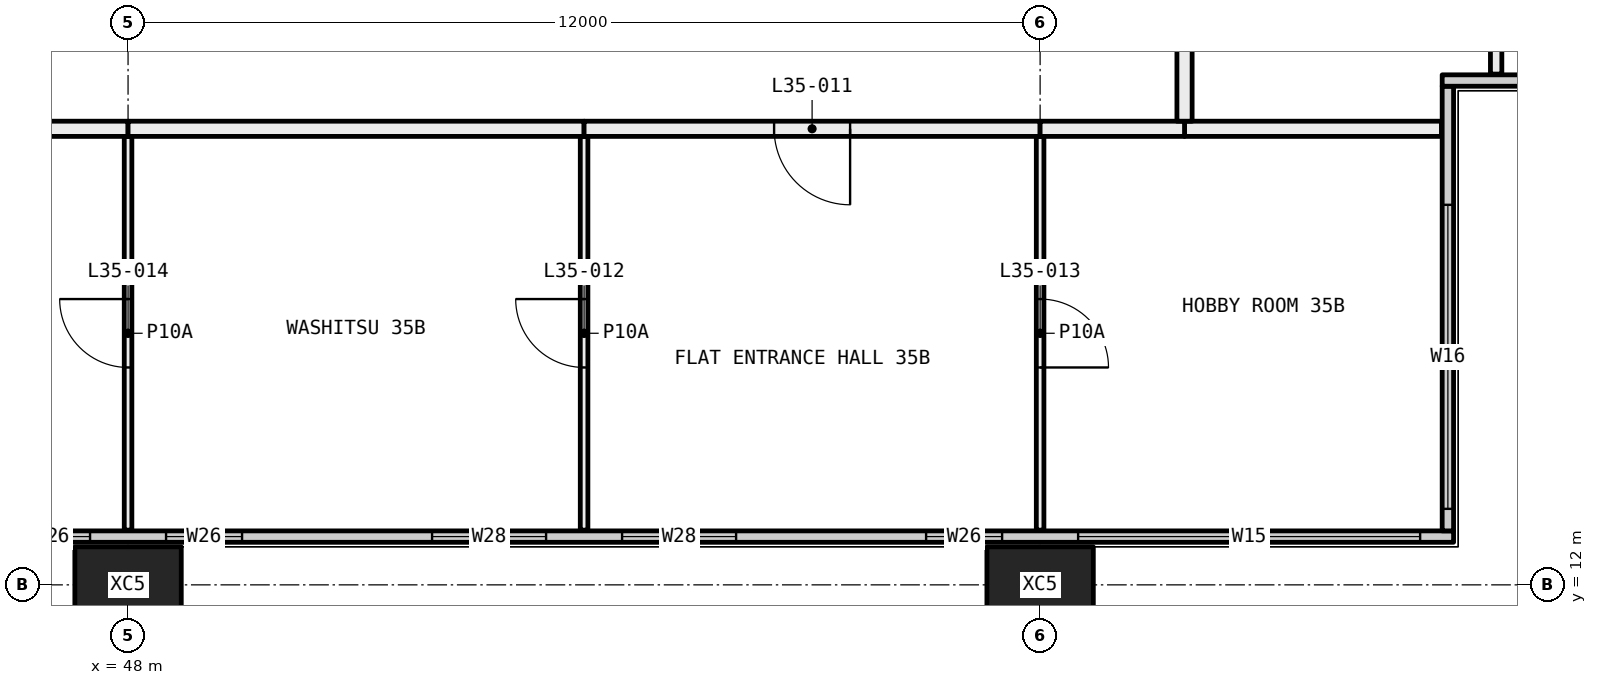
"""IFC4 building model, lengths in metres.
Left out: names, types, materials, properties, quantities, classifications, styles, units other than length and angle.
Written with IfcOpenShell. Run it as: python <this file> out.ifc"""

import sys

from ifc_helpers import new_model, si_unit, direction, frame, frame_2d, origin, origin_2d, place, context, subcontext, project, spatial, rectangle, hollow_rectangle, extrude, element, fill, save


model = new_model("IFC4")
c1 = context("Model", 3, precision=1e-05, world=origin(), true_north=direction((0.0, 1.0)))
c2 = subcontext(c1, "Body", "Model", "MODEL_VIEW")
j1 = project(units=[si_unit("LENGTHUNIT", "METRE"), si_unit("PLANEANGLEUNIT", "RADIAN")], contexts=[c1])
p1 = place(None, origin())
s1 = spatial("IfcSite", under=j1, at=p1, CompositionType="ELEMENT")
p2 = place(p1, origin())
s2 = spatial("IfcBuilding", under=s1, at=p2, CompositionType="ELEMENT")
p3 = place(p2, frame((0.0, 0.0, 134.55)))
s3 = spatial("IfcBuildingStorey", under=s2, at=p3, CompositionType="ELEMENT", Elevation=134.55)
for number, where, z_axis, x_axis in (
    (1, (48.0, 12.0, -0.4), (0.0, 0.0, 1.0), (1.0, 0.0, 0.0)),
    (2, (60.0, 12.0, -0.4), (0.0, 0.0, 1.0), (1.0, 0.0, 0.0)),
):
    element("IfcColumn", number, at=place(p3, frame(where, z_axis=z_axis, x_axis=x_axis)), inside=s3, PredefinedType="COLUMN", context=c2, shape_type="SweptSolid", body=[
        extrude(hollow_rectangle(XDim=1.4, YDim=1.0, WallThickness=0.055, at=origin_2d()), origin(), (0.0, 0.0, 1.0), 3.45),
    ])
p4 = place(p3, frame((6.56, 12.635, 0.0), z_axis=(0.0, 0.0, 1.0), x_axis=(1.0, 0.0, 0.0)))
e3 = element("IfcWall", 3, at=p4, inside=s3, PredefinedType="ELEMENTEDWALL", context=c2, shape_type="SweptSolid", body=[
    extrude(rectangle(XDim=58.88, YDim=0.15, at=frame_2d((29.44, 0.0))), origin(), (0.0, 0.0, 1.0), 3.05),
])
p5 = place(p4, frame((0.44, 0.0, 0.45)))
e4 = element("IfcOpeningElement", 4, at=p5, cuts=e3, PredefinedType="OPENING", context=c2, shape_type="SweptSolid", body=[
    extrude(rectangle(XDim=4.5, YDim=2.55, at=frame_2d((2.25, 1.275))), frame((0.0, 0.085, 0.0), z_axis=(0.0, -1.0, 0.0), x_axis=(1.0, 0.0, 0.0)), (0.0, 0.0, 1.0), 0.17),
])
p6 = place(p4, frame((5.94, 0.0, 0.45)))
e5 = element("IfcOpeningElement", 5, at=p6, cuts=e3, PredefinedType="OPENING", context=c2, shape_type="SweptSolid", body=[
    extrude(rectangle(XDim=1.0, YDim=2.55, at=frame_2d((0.5, 1.275))), frame((0.0, 0.085, 0.0), z_axis=(0.0, -1.0, 0.0), x_axis=(1.0, 0.0, 0.0)), (0.0, 0.0, 1.0), 0.17),
])
p7 = place(p4, frame((9.44, 0.0, 0.45)))
e6 = element("IfcOpeningElement", 6, at=p7, cuts=e3, PredefinedType="OPENING", context=c2, shape_type="SweptSolid", body=[
    extrude(rectangle(XDim=1.5, YDim=2.55, at=frame_2d((0.75, 1.275))), frame((0.0, 0.085, 0.0), z_axis=(0.0, -1.0, 0.0), x_axis=(1.0, 0.0, 0.0)), (0.0, 0.0, 1.0), 0.17),
])
p8 = place(p4, frame((11.94, 0.0, 0.45)))
e7 = element("IfcOpeningElement", 7, at=p8, cuts=e3, PredefinedType="OPENING", context=c2, shape_type="SweptSolid", body=[
    extrude(rectangle(XDim=1.5, YDim=2.55, at=frame_2d((0.75, 1.275))), frame((0.0, 0.085, 0.0), z_axis=(0.0, -1.0, 0.0), x_axis=(1.0, 0.0, 0.0)), (0.0, 0.0, 1.0), 0.17),
])
p9 = place(p4, frame((15.94, 0.0, 0.45)))
e8 = element("IfcOpeningElement", 8, at=p9, cuts=e3, PredefinedType="OPENING", context=c2, shape_type="SweptSolid", body=[
    extrude(rectangle(XDim=1.0, YDim=2.55, at=frame_2d((0.5, 1.275))), frame((0.0, 0.085, 0.0), z_axis=(0.0, -1.0, 0.0), x_axis=(1.0, 0.0, 0.0)), (0.0, 0.0, 1.0), 0.17),
])
p10 = place(p4, frame((17.94, 0.0, 0.45)))
e9 = element("IfcOpeningElement", 9, at=p10, cuts=e3, PredefinedType="OPENING", context=c2, shape_type="SweptSolid", body=[
    extrude(rectangle(XDim=1.0, YDim=2.55, at=frame_2d((0.5, 1.275))), frame((0.0, 0.085, 0.0), z_axis=(0.0, -1.0, 0.0), x_axis=(1.0, 0.0, 0.0)), (0.0, 0.0, 1.0), 0.17),
])
p11 = place(p4, frame((21.44, 0.0, 0.45)))
e10 = element("IfcOpeningElement", 10, at=p11, cuts=e3, PredefinedType="OPENING", context=c2, shape_type="SweptSolid", body=[
    extrude(rectangle(XDim=1.5, YDim=2.55, at=frame_2d((0.75, 1.275))), frame((0.0, 0.085, 0.0), z_axis=(0.0, -1.0, 0.0), x_axis=(1.0, 0.0, 0.0)), (0.0, 0.0, 1.0), 0.17),
])
p12 = place(p4, frame((23.94, 0.0, 0.45)))
e11 = element("IfcOpeningElement", 11, at=p12, cuts=e3, PredefinedType="OPENING", context=c2, shape_type="SweptSolid", body=[
    extrude(rectangle(XDim=1.5, YDim=2.55, at=frame_2d((0.75, 1.275))), frame((0.0, 0.085, 0.0), z_axis=(0.0, -1.0, 0.0), x_axis=(1.0, 0.0, 0.0)), (0.0, 0.0, 1.0), 0.17),
])
p13 = place(p4, frame((27.94, 0.0, 0.45)))
e12 = element("IfcOpeningElement", 12, at=p13, cuts=e3, PredefinedType="OPENING", context=c2, shape_type="SweptSolid", body=[
    extrude(rectangle(XDim=1.0, YDim=2.55, at=frame_2d((0.5, 1.275))), frame((0.0, 0.085, 0.0), z_axis=(0.0, -1.0, 0.0), x_axis=(1.0, 0.0, 0.0)), (0.0, 0.0, 1.0), 0.17),
])
p14 = place(p4, frame((29.94, 0.0, 0.45)))
e13 = element("IfcOpeningElement", 13, at=p14, cuts=e3, PredefinedType="OPENING", context=c2, shape_type="SweptSolid", body=[
    extrude(rectangle(XDim=1.0, YDim=2.55, at=frame_2d((0.5, 1.275))), frame((0.0, 0.085, 0.0), z_axis=(0.0, -1.0, 0.0), x_axis=(1.0, 0.0, 0.0)), (0.0, 0.0, 1.0), 0.17),
])
p15 = place(p4, frame((33.44, 0.0, 0.45)))
e14 = element("IfcOpeningElement", 14, at=p15, cuts=e3, PredefinedType="OPENING", context=c2, shape_type="SweptSolid", body=[
    extrude(rectangle(XDim=1.5, YDim=2.55, at=frame_2d((0.75, 1.275))), frame((0.0, 0.085, 0.0), z_axis=(0.0, -1.0, 0.0), x_axis=(1.0, 0.0, 0.0)), (0.0, 0.0, 1.0), 0.17),
])
p16 = place(p4, frame((35.94, 0.0, 0.45)))
e15 = element("IfcOpeningElement", 15, at=p16, cuts=e3, PredefinedType="OPENING", context=c2, shape_type="SweptSolid", body=[
    extrude(rectangle(XDim=1.5, YDim=2.55, at=frame_2d((0.75, 1.275))), frame((0.0, 0.085, 0.0), z_axis=(0.0, -1.0, 0.0), x_axis=(1.0, 0.0, 0.0)), (0.0, 0.0, 1.0), 0.17),
])
p17 = place(p4, frame((39.94, 0.0, 0.45)))
e16 = element("IfcOpeningElement", 16, at=p17, cuts=e3, PredefinedType="OPENING", context=c2, shape_type="SweptSolid", body=[
    extrude(rectangle(XDim=1.0, YDim=2.55, at=frame_2d((0.5, 1.275))), frame((0.0, 0.085, 0.0), z_axis=(0.0, -1.0, 0.0), x_axis=(1.0, 0.0, 0.0)), (0.0, 0.0, 1.0), 0.17),
])
p18 = place(p4, frame((41.94, 0.0, 0.45)))
e17 = element("IfcOpeningElement", 17, at=p18, cuts=e3, PredefinedType="OPENING", context=c2, shape_type="SweptSolid", body=[
    extrude(rectangle(XDim=1.0, YDim=2.55, at=frame_2d((0.5, 1.275))), frame((0.0, 0.085, 0.0), z_axis=(0.0, -1.0, 0.0), x_axis=(1.0, 0.0, 0.0)), (0.0, 0.0, 1.0), 0.17),
])
p19 = place(p4, frame((45.44, 0.0, 0.45)))
e18 = element("IfcOpeningElement", 18, at=p19, cuts=e3, PredefinedType="OPENING", context=c2, shape_type="SweptSolid", body=[
    extrude(rectangle(XDim=1.5, YDim=2.55, at=frame_2d((0.75, 1.275))), frame((0.0, 0.085, 0.0), z_axis=(0.0, -1.0, 0.0), x_axis=(1.0, 0.0, 0.0)), (0.0, 0.0, 1.0), 0.17),
])
p20 = place(p4, frame((47.94, 0.0, 0.45)))
e19 = element("IfcOpeningElement", 19, at=p20, cuts=e3, PredefinedType="OPENING", context=c2, shape_type="SweptSolid", body=[
    extrude(rectangle(XDim=1.5, YDim=2.55, at=frame_2d((0.75, 1.275))), frame((0.0, 0.085, 0.0), z_axis=(0.0, -1.0, 0.0), x_axis=(1.0, 0.0, 0.0)), (0.0, 0.0, 1.0), 0.17),
])
p21 = place(p4, frame((51.94, 0.0, 0.45)))
e20 = element("IfcOpeningElement", 20, at=p21, cuts=e3, PredefinedType="OPENING", context=c2, shape_type="SweptSolid", body=[
    extrude(rectangle(XDim=1.0, YDim=2.55, at=frame_2d((0.5, 1.275))), frame((0.0, 0.085, 0.0), z_axis=(0.0, -1.0, 0.0), x_axis=(1.0, 0.0, 0.0)), (0.0, 0.0, 1.0), 0.17),
])
p22 = place(p4, frame((53.94, 0.0, 0.45)))
e21 = element("IfcOpeningElement", 21, at=p22, cuts=e3, PredefinedType="OPENING", context=c2, shape_type="SweptSolid", body=[
    extrude(rectangle(XDim=4.5, YDim=2.55, at=frame_2d((2.25, 1.275))), frame((0.0, 0.085, 0.0), z_axis=(0.0, -1.0, 0.0), x_axis=(1.0, 0.0, 0.0)), (0.0, 0.0, 1.0), 0.17),
])
p23 = place(p3, frame((65.365, 12.71, 0.0), z_axis=(0.0, 0.0, 1.0), x_axis=(0.0, 1.0, 0.0)))
e22 = element("IfcWall", 22, at=p23, inside=s3, PredefinedType="ELEMENTEDWALL", context=c2, shape_type="SweptSolid", body=[
    extrude(rectangle(XDim=5.85, YDim=0.15, at=frame_2d((2.925, 0.0))), origin(), (0.0, 0.0, 1.0), 3.05),
])
p24 = place(p23, frame((0.29, 0.0, 0.45)))
e23 = element("IfcOpeningElement", 23, at=p24, cuts=e22, PredefinedType="OPENING", context=c2, shape_type="SweptSolid", body=[
    extrude(rectangle(XDim=4.0, YDim=2.55, at=frame_2d((2.0, 1.275))), frame((0.0, 0.085, 0.0), z_axis=(0.0, -1.0, 0.0), x_axis=(1.0, 0.0, 0.0)), (0.0, 0.0, 1.0), 0.17),
])
p25 = place(p3, frame((65.29, 18.635, 0.0), z_axis=(0.0, 0.0, 1.0), x_axis=(1.0, 0.0, 0.0)))
e24 = element("IfcWall", 24, at=p25, inside=s3, PredefinedType="ELEMENTEDWALL", context=c2, shape_type="SweptSolid", body=[
    extrude(rectangle(XDim=6.15, YDim=0.15, at=frame_2d((3.075, 0.0))), origin(), (0.0, 0.0, 1.0), 3.05),
])
p26 = place(p25, frame((1.71, 0.0, 0.45)))
e25 = element("IfcOpeningElement", 25, at=p26, cuts=e24, PredefinedType="OPENING", context=c2, shape_type="SweptSolid", body=[
    extrude(rectangle(XDim=4.0, YDim=2.55, at=frame_2d((2.0, 1.275))), frame((0.0, 0.085, 0.0), z_axis=(0.0, -1.0, 0.0), x_axis=(1.0, 0.0, 0.0)), (0.0, 0.0, 1.0), 0.17),
])
p27 = place(p3, frame((48.0, 12.72, 0.0), z_axis=(0.0, 0.0, 1.0), x_axis=(0.0, 1.0, 0.0)))
e26 = element("IfcWall", 26, at=p27, inside=s3, PredefinedType="PARTITIONING", context=c2, shape_type="SweptSolid", body=[
    extrude(rectangle(XDim=5.18, YDim=0.1, at=frame_2d((2.59, 0.0))), origin(), (0.0, 0.0, 1.0), 3.05),
])
p28 = place(p27, frame((2.14, 0.0, 0.0)))
e27 = element("IfcOpeningElement", 27, at=p28, cuts=e26, PredefinedType="OPENING", context=c2, shape_type="SweptSolid", body=[
    extrude(rectangle(XDim=0.9, YDim=2.1, at=frame_2d((0.45, 1.05))), frame((0.0, 0.06, 0.0), z_axis=(0.0, -1.0, 0.0), x_axis=(1.0, 0.0, 0.0)), (0.0, 0.0, 1.0), 0.12),
])
p29 = place(p3, frame((48.0, 18.0, 0.0), z_axis=(0.0, 0.0, 1.0), x_axis=(-1.0, 0.0, 0.0)))
e28 = element("IfcWall", 28, at=p29, inside=s3, PredefinedType="PARTITIONING", context=c2, shape_type="SweptSolid", body=[
    extrude(rectangle(XDim=1.9, YDim=0.2, at=frame_2d((0.95, 0.0))), origin(), (0.0, 0.0, 1.0), 3.05),
])
p30 = place(p3, frame((54.0, 12.72, 0.0), z_axis=(0.0, 0.0, 1.0), x_axis=(0.0, 1.0, 0.0)))
e29 = element("IfcWall", 29, at=p30, inside=s3, PredefinedType="PARTITIONING", context=c2, shape_type="SweptSolid", body=[
    extrude(rectangle(XDim=5.18, YDim=0.1, at=frame_2d((2.59, 0.0))), origin(), (0.0, 0.0, 1.0), 3.05),
])
p31 = place(p30, frame((2.14, 0.0, 0.0)))
e30 = element("IfcOpeningElement", 30, at=p31, cuts=e29, PredefinedType="OPENING", context=c2, shape_type="SweptSolid", body=[
    extrude(rectangle(XDim=0.9, YDim=2.1, at=frame_2d((0.45, 1.05))), frame((0.0, 0.06, 0.0), z_axis=(0.0, -1.0, 0.0), x_axis=(1.0, 0.0, 0.0)), (0.0, 0.0, 1.0), 0.12),
])
p32 = place(p3, frame((54.0, 18.0, 0.0), z_axis=(0.0, 0.0, 1.0), x_axis=(-1.0, 0.0, 0.0)))
e31 = element("IfcWall", 31, at=p32, inside=s3, PredefinedType="PARTITIONING", context=c2, shape_type="SweptSolid", body=[
    extrude(rectangle(XDim=6.0, YDim=0.2, at=frame_2d((3.0, 0.0))), origin(), (0.0, 0.0, 1.0), 3.05),
])
p33 = place(p3, frame((60.0, 12.72, 0.0), z_axis=(0.0, 0.0, 1.0), x_axis=(0.0, 1.0, 0.0)))
e32 = element("IfcWall", 32, at=p33, inside=s3, PredefinedType="PARTITIONING", context=c2, shape_type="SweptSolid", body=[
    extrude(rectangle(XDim=5.18, YDim=0.1, at=frame_2d((2.59, 0.0))), origin(), (0.0, 0.0, 1.0), 3.05),
])
p34 = place(p33, frame((2.14, 0.0, 0.0)))
e33 = element("IfcOpeningElement", 33, at=p34, cuts=e32, PredefinedType="OPENING", context=c2, shape_type="SweptSolid", body=[
    extrude(rectangle(XDim=0.9, YDim=2.1, at=frame_2d((0.45, 1.05))), frame((0.0, 0.06, 0.0), z_axis=(0.0, -1.0, 0.0), x_axis=(1.0, 0.0, 0.0)), (0.0, 0.0, 1.0), 0.12),
])
p35 = place(p3, frame((60.0, 18.0, 0.0), z_axis=(0.0, 0.0, 1.0), x_axis=(-1.0, 0.0, 0.0)))
e34 = element("IfcWall", 34, at=p35, inside=s3, PredefinedType="PARTITIONING", context=c2, shape_type="SweptSolid", body=[
    extrude(rectangle(XDim=6.0, YDim=0.2, at=frame_2d((3.0, 0.0))), origin(), (0.0, 0.0, 1.0), 3.05),
])
p36 = place(p35, frame((2.5, 0.0, 0.0)))
e35 = element("IfcOpeningElement", 35, at=p36, cuts=e34, PredefinedType="OPENING", context=c2, shape_type="SweptSolid", body=[
    extrude(rectangle(XDim=1.0, YDim=2.1, at=frame_2d((0.5, 1.05))), frame((0.0, 0.11, 0.0), z_axis=(0.0, -1.0, 0.0), x_axis=(1.0, 0.0, 0.0)), (0.0, 0.0, 1.0), 0.22),
])
p37 = place(p3, frame((65.28, 18.0, 0.0), z_axis=(0.0, 0.0, 1.0), x_axis=(-1.0, 0.0, 0.0)))
e36 = element("IfcWall", 36, at=p37, inside=s3, PredefinedType="PARTITIONING", context=c2, shape_type="SweptSolid", body=[
    extrude(rectangle(XDim=3.38, YDim=0.2, at=frame_2d((1.69, 0.0))), origin(), (0.0, 0.0, 1.0), 3.05),
])
p38 = place(p3, frame((61.9, 18.0, 0.0), z_axis=(0.0, 0.0, 1.0), x_axis=(-1.0, 0.0, 0.0)))
e37 = element("IfcWall", 37, at=p38, inside=s3, PredefinedType="PARTITIONING", context=c2, shape_type="SweptSolid", body=[
    extrude(rectangle(XDim=1.9, YDim=0.2, at=frame_2d((0.95, 0.0))), origin(), (0.0, 0.0, 1.0), 3.05),
])
p39 = place(p3, frame((66.0, 21.0, 0.0), z_axis=(0.0, 0.0, 1.0), x_axis=(0.0, -1.0, 0.0)))
e38 = element("IfcWall", 38, at=p39, inside=s3, PredefinedType="PARTITIONING", context=c2, shape_type="SweptSolid", body=[
    extrude(rectangle(XDim=2.28, YDim=0.15, at=frame_2d((1.14, 0.0))), origin(), (0.0, 0.0, 1.0), 3.05),
])
p40 = place(p3, frame((61.9, 21.0, 0.0), z_axis=(0.0, 0.0, 1.0), x_axis=(0.0, -1.0, 0.0)))
e39 = element("IfcWall", 39, at=p40, inside=s3, PredefinedType="PARTITIONING", context=c2, shape_type="SweptSolid", body=[
    extrude(rectangle(XDim=2.9, YDim=0.2, at=frame_2d((1.45, 0.0))), origin(), (0.0, 0.0, 1.0), 3.05),
])
p41 = place(p17, origin())
e40 = element("IfcWindow", 40, at=p41, inside=s3, PartitioningType="SINGLE_PANEL", PredefinedType="WINDOW", context=c2, shape_type="SweptSolid", body=[
    extrude(rectangle(XDim=1.0, YDim=2.55, at=frame_2d((0.5, 1.275))), frame((0.0, 0.03, 0.0), z_axis=(0.0, -1.0, 0.0), x_axis=(1.0, 0.0, 0.0)), (0.0, 0.0, 1.0), 0.06),
])
fill(e16, e40)
p42 = place(p18, origin())
e41 = element("IfcWindow", 41, at=p42, inside=s3, PartitioningType="SINGLE_PANEL", PredefinedType="WINDOW", context=c2, shape_type="SweptSolid", body=[
    extrude(rectangle(XDim=1.0, YDim=2.55, at=frame_2d((0.5, 1.275))), frame((0.0, 0.03, 0.0), z_axis=(0.0, -1.0, 0.0), x_axis=(1.0, 0.0, 0.0)), (0.0, 0.0, 1.0), 0.06),
])
fill(e17, e41)
p43 = place(p19, origin())
e42 = element("IfcWindow", 42, at=p43, inside=s3, PartitioningType="SINGLE_PANEL", PredefinedType="WINDOW", context=c2, shape_type="SweptSolid", body=[
    extrude(rectangle(XDim=1.5, YDim=2.55, at=frame_2d((0.75, 1.275))), frame((0.0, 0.03, 0.0), z_axis=(0.0, -1.0, 0.0), x_axis=(1.0, 0.0, 0.0)), (0.0, 0.0, 1.0), 0.06),
])
fill(e18, e42)
p44 = place(p20, origin())
e43 = element("IfcWindow", 43, at=p44, inside=s3, PartitioningType="SINGLE_PANEL", PredefinedType="WINDOW", context=c2, shape_type="SweptSolid", body=[
    extrude(rectangle(XDim=1.5, YDim=2.55, at=frame_2d((0.75, 1.275))), frame((0.0, 0.03, 0.0), z_axis=(0.0, -1.0, 0.0), x_axis=(1.0, 0.0, 0.0)), (0.0, 0.0, 1.0), 0.06),
])
fill(e19, e43)
p45 = place(p21, origin())
e44 = element("IfcWindow", 44, at=p45, inside=s3, PartitioningType="SINGLE_PANEL", PredefinedType="WINDOW", context=c2, shape_type="SweptSolid", body=[
    extrude(rectangle(XDim=1.0, YDim=2.55, at=frame_2d((0.5, 1.275))), frame((0.0, 0.03, 0.0), z_axis=(0.0, -1.0, 0.0), x_axis=(1.0, 0.0, 0.0)), (0.0, 0.0, 1.0), 0.06),
])
fill(e20, e44)
p46 = place(p22, origin())
e45 = element("IfcWindow", 45, at=p46, inside=s3, PartitioningType="SINGLE_PANEL", PredefinedType="WINDOW", context=c2, shape_type="SweptSolid", body=[
    extrude(rectangle(XDim=4.5, YDim=2.55, at=frame_2d((2.25, 1.275))), frame((0.0, 0.03, 0.0), z_axis=(0.0, -1.0, 0.0), x_axis=(1.0, 0.0, 0.0)), (0.0, 0.0, 1.0), 0.06),
])
fill(e21, e45)
p47 = place(p24, origin())
e46 = element("IfcWindow", 46, at=p47, inside=s3, PartitioningType="SINGLE_PANEL", PredefinedType="WINDOW", context=c2, shape_type="SweptSolid", body=[
    extrude(rectangle(XDim=4.0, YDim=2.55, at=frame_2d((2.0, 1.275))), frame((0.0, 0.03, 0.0), z_axis=(0.0, -1.0, 0.0), x_axis=(1.0, 0.0, 0.0)), (0.0, 0.0, 1.0), 0.06),
])
fill(e23, e46)
p48 = place(p36, origin())
e47 = element("IfcDoor", 47, at=p48, inside=s3, OperationType="SINGLE_SWING_RIGHT", PredefinedType="DOOR", context=c2, shape_type="SweptSolid", body=[
    extrude(rectangle(XDim=1.0, YDim=2.1, at=frame_2d((0.5, 1.05))), frame((0.0, 0.025, 0.0), z_axis=(0.0, -1.0, 0.0), x_axis=(1.0, 0.0, 0.0)), (0.0, 0.0, 1.0), 0.05),
])
fill(e35, e47)
p49 = place(p31, origin())
e48 = element("IfcDoor", 48, at=p49, inside=s3, OperationType="SINGLE_SWING_LEFT", PredefinedType="DOOR", context=c2, shape_type="SweptSolid", body=[
    extrude(rectangle(XDim=0.9, YDim=2.1, at=frame_2d((0.45, 1.05))), frame((0.0, 0.025, 0.0), z_axis=(0.0, -1.0, 0.0), x_axis=(1.0, 0.0, 0.0)), (0.0, 0.0, 1.0), 0.05),
])
fill(e30, e48)
p50 = place(p34, frame((0.9, 0.0, 0.0), x_axis=(-1.0, 0.0, 0.0)))
e49 = element("IfcDoor", 49, at=p50, inside=s3, OperationType="SINGLE_SWING_LEFT", PredefinedType="DOOR", context=c2, shape_type="SweptSolid", body=[
    extrude(rectangle(XDim=0.9, YDim=2.1, at=frame_2d((0.45, 1.05))), frame((0.0, 0.025, 0.0), z_axis=(0.0, -1.0, 0.0), x_axis=(1.0, 0.0, 0.0)), (0.0, 0.0, 1.0), 0.05),
])
fill(e33, e49)
p51 = place(p28, origin())
e50 = element("IfcDoor", 50, at=p51, inside=s3, OperationType="SINGLE_SWING_LEFT", PredefinedType="DOOR", context=c2, shape_type="SweptSolid", body=[
    extrude(rectangle(XDim=0.9, YDim=2.1, at=frame_2d((0.45, 1.05))), frame((0.0, 0.025, 0.0), z_axis=(0.0, -1.0, 0.0), x_axis=(1.0, 0.0, 0.0)), (0.0, 0.0, 1.0), 0.05),
])
fill(e27, e50)
save(model, sys.argv[1])
